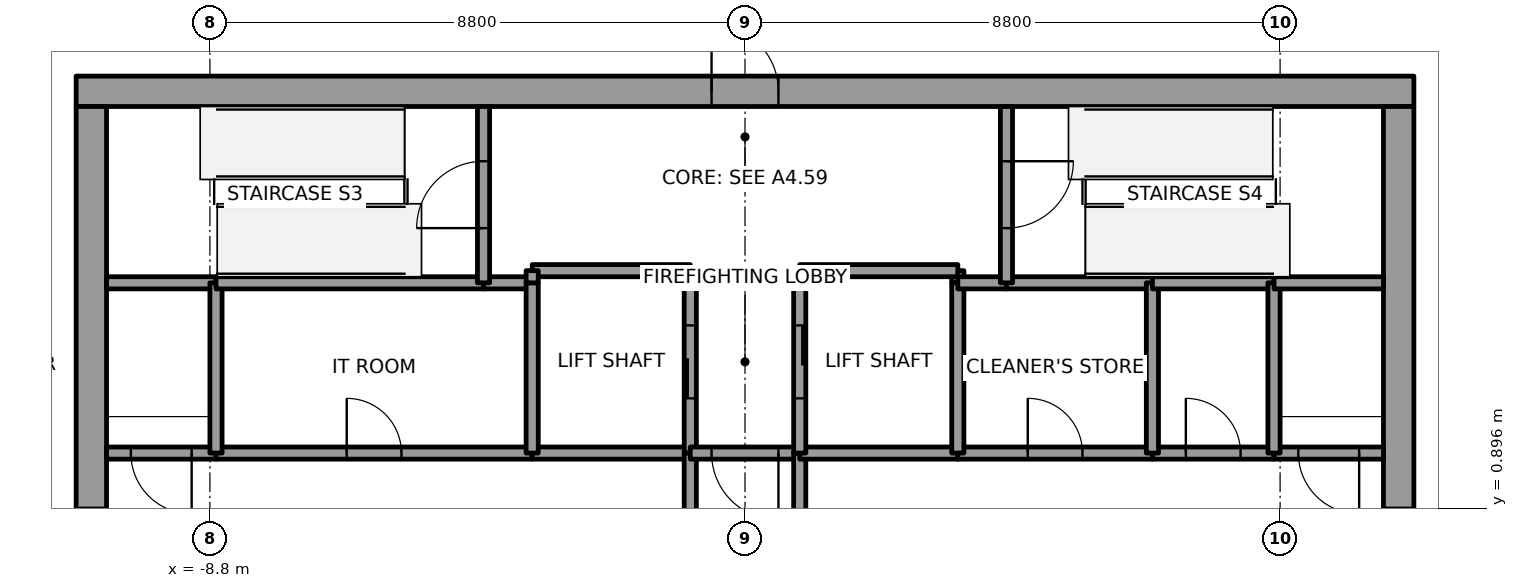
"""IFC4 building model, lengths in metres.
Left out: names, types, materials, properties, quantities, classifications, styles, units other than length and angle.
Written with IfcOpenShell. Run it as: python <this file> out.ifc"""

import sys

from ifc_helpers import new_model, si_unit, direction, frame, frame_2d, origin, place, context, subcontext, project, spatial, rectangle, extrude, element, fill, save


model = new_model("IFC4")
c1 = context("Model", 3, precision=1e-05, world=origin(), true_north=direction((0.0, 1.0)))
c2 = subcontext(c1, "Body", "Model", "MODEL_VIEW")
j1 = project(units=[si_unit("LENGTHUNIT", "METRE"), si_unit("PLANEANGLEUNIT", "RADIAN")], contexts=[c1])
p1 = place(None, origin())
s1 = spatial("IfcSite", under=j1, at=p1, CompositionType="ELEMENT")
p2 = place(p1, origin())
s2 = spatial("IfcBuilding", under=s1, at=p2, CompositionType="ELEMENT")
p3 = place(p2, frame((0.0, 0.0, 255.0)))
s3 = spatial("IfcBuildingStorey", under=s2, at=p3, CompositionType="ELEMENT", Elevation=255.0)
p4 = place(p3, frame((-11.0, 7.75, 0.0), z_axis=(0.0, 0.0, 1.0), x_axis=(1.0, 0.0, 0.0)))
e1 = element("IfcWall", 1, at=p4, inside=s3, PredefinedType="SHEAR", context=c2, shape_type="SweptSolid", body=[
    extrude(rectangle(XDim=22.0, YDim=0.5, at=frame_2d((11.0, 0.0))), origin(), (0.0, 0.0, 1.0), 4.0),
])
p5 = place(p4, frame((10.45, 0.0, 0.0)))
e2 = element("IfcOpeningElement", 2, at=p5, cuts=e1, PredefinedType="OPENING", context=c2, shape_type="SweptSolid", body=[
    extrude(rectangle(XDim=1.1, YDim=2.1, at=frame_2d((0.55, 1.05))), frame((0.0, 0.25, 0.0), z_axis=(0.0, -1.0, 0.0), x_axis=(1.0, 0.0, 0.0)), (0.0, 0.0, 1.0), 0.5),
])
p6 = place(p3, frame((-10.75, -7.5, 0.0), z_axis=(0.0, 0.0, 1.0), x_axis=(0.0, 1.0, 0.0)))
e3 = element("IfcWall", 3, at=p6, inside=s3, PredefinedType="SHEAR", context=c2, shape_type="SweptSolid", body=[
    extrude(rectangle(XDim=15.0, YDim=0.5, at=frame_2d((7.5, 0.0))), origin(), (0.0, 0.0, 1.0), 4.0),
])
p7 = place(p6, frame((6.6, 0.0, 0.0)))
e4 = element("IfcOpeningElement", 4, at=p7, cuts=e3, PredefinedType="OPENING", context=c2, shape_type="SweptSolid", body=[
    extrude(rectangle(XDim=1.8, YDim=2.1, at=frame_2d((0.9, 1.05))), frame((0.0, 0.25, 0.0), z_axis=(0.0, -1.0, 0.0), x_axis=(1.0, 0.0, 0.0)), (0.0, 0.0, 1.0), 0.5),
])
p8 = place(p3, frame((10.75, -7.5, 0.0), z_axis=(0.0, 0.0, 1.0), x_axis=(0.0, 1.0, 0.0)))
e5 = element("IfcWall", 5, at=p8, inside=s3, PredefinedType="SHEAR", context=c2, shape_type="SweptSolid", body=[
    extrude(rectangle(XDim=15.0, YDim=0.5, at=frame_2d((7.5, 0.0))), origin(), (0.0, 0.0, 1.0), 4.0),
])
p9 = place(p8, frame((6.6, 0.0, 0.0)))
e6 = element("IfcOpeningElement", 6, at=p9, cuts=e5, PredefinedType="OPENING", context=c2, shape_type="SweptSolid", body=[
    extrude(rectangle(XDim=1.8, YDim=2.1, at=frame_2d((0.9, 1.05))), frame((0.0, 0.25, 0.0), z_axis=(0.0, -1.0, 0.0), x_axis=(1.0, 0.0, 0.0)), (0.0, 0.0, 1.0), 0.5),
])
p10 = place(p3, frame((-8.7, 1.8, 0.0), z_axis=(0.0, 0.0, 1.0), x_axis=(-1.0, 0.0, 0.0)))
e7 = element("IfcWall", 7, at=p10, inside=s3, PredefinedType="SOLIDWALL", context=c2, shape_type="SweptSolid", body=[
    extrude(rectangle(XDim=1.8, YDim=0.2, at=frame_2d((0.9, 0.0))), origin(), (0.0, 0.0, 1.0), 3.85),
])
p11 = place(p10, frame((0.4, 0.0, 0.0)))
e8 = element("IfcOpeningElement", 8, at=p11, cuts=e7, PredefinedType="OPENING", context=c2, shape_type="SweptSolid", body=[
    extrude(rectangle(XDim=1.0, YDim=2.1, at=frame_2d((0.5, 1.05))), frame((0.0, 0.1, 0.0), z_axis=(0.0, -1.0, 0.0), x_axis=(1.0, 0.0, 0.0)), (0.0, 0.0, 1.0), 0.2),
])
p12 = place(p3, frame((-8.7, 4.6, 0.0), z_axis=(0.0, 0.0, 1.0), x_axis=(-1.0, 0.0, 0.0)))
e9 = element("IfcWall", 9, at=p12, inside=s3, PredefinedType="SOLIDWALL", context=c2, shape_type="SweptSolid", body=[
    extrude(rectangle(XDim=1.8, YDim=0.2, at=frame_2d((0.9, 0.0))), origin(), (0.0, 0.0, 1.0), 3.85),
])
p13 = place(p3, frame((-8.7, 1.8, 0.0), z_axis=(0.0, 0.0, 1.0), x_axis=(1.0, 0.0, 0.0)))
e10 = element("IfcWall", 10, at=p13, inside=s3, PredefinedType="SOLIDWALL", context=c2, shape_type="SweptSolid", body=[
    extrude(rectangle(XDim=5.2, YDim=0.2, at=frame_2d((2.6, 0.0))), origin(), (0.0, 0.0, 1.0), 3.85),
])
p14 = place(p13, frame((2.15, 0.0, 0.0)))
e11 = element("IfcOpeningElement", 11, at=p14, cuts=e10, PredefinedType="OPENING", context=c2, shape_type="SweptSolid", body=[
    extrude(rectangle(XDim=0.9, YDim=2.1, at=frame_2d((0.45, 1.05))), frame((0.0, 0.1, 0.0), z_axis=(0.0, -1.0, 0.0), x_axis=(1.0, 0.0, 0.0)), (0.0, 0.0, 1.0), 0.2),
])
p15 = place(p3, frame((-8.7, 4.6, 0.0), z_axis=(0.0, 0.0, 1.0), x_axis=(0.0, -1.0, 0.0)))
e12 = element("IfcWall", 12, at=p15, inside=s3, PredefinedType="SOLIDWALL", context=c2, shape_type="SweptSolid", body=[
    extrude(rectangle(XDim=2.8, YDim=0.2, at=frame_2d((1.4, 0.0))), origin(), (0.0, 0.0, 1.0), 3.85),
])
p16 = place(p3, frame((-4.3, 4.6, 0.0), z_axis=(0.0, 0.0, 1.0), x_axis=(-1.0, 0.0, 0.0)))
e13 = element("IfcWall", 13, at=p16, inside=s3, PredefinedType="SOLIDWALL", context=c2, shape_type="SweptSolid", body=[
    extrude(rectangle(XDim=4.4, YDim=0.2, at=frame_2d((2.2, 0.0))), origin(), (0.0, 0.0, 1.0), 3.85),
])
p17 = place(p3, frame((-3.5, 4.6, 0.0), z_axis=(0.0, 0.0, 1.0), x_axis=(-1.0, 0.0, 0.0)))
e14 = element("IfcWall", 14, at=p17, inside=s3, PredefinedType="SOLIDWALL", context=c2, shape_type="SweptSolid", body=[
    extrude(rectangle(XDim=0.8, YDim=0.2, at=frame_2d((0.4, 0.0))), origin(), (0.0, 0.0, 1.0), 3.85),
])
p18 = place(p3, frame((-4.3, 4.6, 0.0), z_axis=(0.0, 0.0, 1.0), x_axis=(0.0, 1.0, 0.0)))
e15 = element("IfcWall", 15, at=p18, inside=s3, PredefinedType="SOLIDWALL", context=c2, shape_type="SweptSolid", body=[
    extrude(rectangle(XDim=2.9, YDim=0.2, at=frame_2d((1.45, 0.0))), origin(), (0.0, 0.0, 1.0), 3.85),
])
p19 = place(p18, frame((0.9, 0.0, 0.0)))
e16 = element("IfcOpeningElement", 16, at=p19, cuts=e15, PredefinedType="OPENING", context=c2, shape_type="SweptSolid", body=[
    extrude(rectangle(XDim=1.1, YDim=2.1, at=frame_2d((0.55, 1.05))), frame((0.0, 0.1, 0.0), z_axis=(0.0, -1.0, 0.0), x_axis=(1.0, 0.0, 0.0)), (0.0, 0.0, 1.0), 0.2),
])
p20 = place(p3, frame((-0.9, 1.8, 0.0), z_axis=(0.0, 0.0, 1.0), x_axis=(-1.0, 0.0, 0.0)))
e17 = element("IfcWall", 17, at=p20, inside=s3, PredefinedType="SOLIDWALL", context=c2, shape_type="SweptSolid", body=[
    extrude(rectangle(XDim=2.6, YDim=0.2, at=frame_2d((1.3, 0.0))), origin(), (0.0, 0.0, 1.0), 3.85),
])
p21 = place(p3, frame((-3.5, 1.8, 0.0), z_axis=(0.0, 0.0, 1.0), x_axis=(0.0, 1.0, 0.0)))
e18 = element("IfcWall", 18, at=p21, inside=s3, PredefinedType="SOLIDWALL", context=c2, shape_type="SweptSolid", body=[
    extrude(rectangle(XDim=2.8, YDim=0.2, at=frame_2d((1.4, 0.0))), origin(), (0.0, 0.0, 1.0), 3.85),
])
p22 = place(p3, frame((-0.9, 1.8, 0.0), z_axis=(0.0, 0.0, 1.0), x_axis=(0.0, 1.0, 0.0)))
e19 = element("IfcWall", 19, at=p22, inside=s3, PredefinedType="SOLIDWALL", context=c2, shape_type="SweptSolid", body=[
    extrude(rectangle(XDim=3.0, YDim=0.2, at=frame_2d((1.5, 0.0))), origin(), (0.0, 0.0, 1.0), 3.85),
])
p23 = place(p22, frame((0.9, 0.0, 0.0)))
e20 = element("IfcOpeningElement", 20, at=p23, cuts=e19, PredefinedType="OPENING", context=c2, shape_type="SweptSolid", body=[
    extrude(rectangle(XDim=1.2, YDim=2.1, at=frame_2d((0.6, 1.05))), frame((0.0, 0.1, 0.0), z_axis=(0.0, -1.0, 0.0), x_axis=(1.0, 0.0, 0.0)), (0.0, 0.0, 1.0), 0.2),
])
p24 = place(p3, frame((-0.9, 4.8, 0.0), z_axis=(0.0, 0.0, 1.0), x_axis=(-1.0, 0.0, 0.0)))
e21 = element("IfcWall", 21, at=p24, inside=s3, PredefinedType="SOLIDWALL", context=c2, shape_type="SweptSolid", body=[
    extrude(rectangle(XDim=2.6, YDim=0.2, at=frame_2d((1.3, 0.0))), origin(), (0.0, 0.0, 1.0), 3.85),
])
p25 = place(p3, frame((-3.5, 4.8, 0.0), z_axis=(0.0, 0.0, 1.0), x_axis=(0.0, -1.0, 0.0)))
e22 = element("IfcWall", 22, at=p25, inside=s3, PredefinedType="SOLIDWALL", context=c2, shape_type="SweptSolid", body=[
    extrude(rectangle(XDim=0.2, YDim=0.2, at=frame_2d((0.1, 0.0))), origin(), (0.0, 0.0, 1.0), 3.85),
])
p26 = place(p3, frame((-0.9, 1.8, 0.0), z_axis=(0.0, 0.0, 1.0), x_axis=(0.0, -1.0, 0.0)))
e23 = element("IfcWall", 23, at=p26, inside=s3, PredefinedType="SOLIDWALL", context=c2, shape_type="SweptSolid", body=[
    extrude(rectangle(XDim=3.6, YDim=0.2, at=frame_2d((1.8, 0.0))), origin(), (0.0, 0.0, 1.0), 3.85),
])
p27 = place(p26, frame((1.05, 0.0, 0.0)))
e24 = element("IfcOpeningElement", 24, at=p27, cuts=e23, PredefinedType="OPENING", context=c2, shape_type="SweptSolid", body=[
    extrude(rectangle(XDim=1.5, YDim=2.1, at=frame_2d((0.75, 1.05))), frame((0.0, 0.1, 0.0), z_axis=(0.0, -1.0, 0.0), x_axis=(1.0, 0.0, 0.0)), (0.0, 0.0, 1.0), 0.2),
])
p28 = place(p3, frame((0.9, 1.8, 0.0), z_axis=(0.0, 0.0, 1.0), x_axis=(-1.0, 0.0, 0.0)))
e25 = element("IfcWall", 25, at=p28, inside=s3, PredefinedType="SOLIDWALL", context=c2, shape_type="SweptSolid", body=[
    extrude(rectangle(XDim=1.8, YDim=0.2, at=frame_2d((0.9, 0.0))), origin(), (0.0, 0.0, 1.0), 3.85),
])
p29 = place(p28, frame((0.35, 0.0, 0.0)))
e26 = element("IfcOpeningElement", 26, at=p29, cuts=e25, PredefinedType="OPENING", context=c2, shape_type="SweptSolid", body=[
    extrude(rectangle(XDim=1.1, YDim=2.1, at=frame_2d((0.55, 1.05))), frame((0.0, 0.1, 0.0), z_axis=(0.0, -1.0, 0.0), x_axis=(1.0, 0.0, 0.0)), (0.0, 0.0, 1.0), 0.2),
])
p30 = place(p3, frame((0.9, -1.8, 0.0), z_axis=(0.0, 0.0, 1.0), x_axis=(0.0, 1.0, 0.0)))
e27 = element("IfcWall", 27, at=p30, inside=s3, PredefinedType="SOLIDWALL", context=c2, shape_type="SweptSolid", body=[
    extrude(rectangle(XDim=3.6, YDim=0.2, at=frame_2d((1.8, 0.0))), origin(), (0.0, 0.0, 1.0), 3.85),
])
p31 = place(p30, frame((1.05, 0.0, 0.0)))
e28 = element("IfcOpeningElement", 28, at=p31, cuts=e27, PredefinedType="OPENING", context=c2, shape_type="SweptSolid", body=[
    extrude(rectangle(XDim=1.5, YDim=2.1, at=frame_2d((0.75, 1.05))), frame((0.0, 0.1, 0.0), z_axis=(0.0, -1.0, 0.0), x_axis=(1.0, 0.0, 0.0)), (0.0, 0.0, 1.0), 0.2),
])
p32 = place(p3, frame((3.5, 1.8, 0.0), z_axis=(0.0, 0.0, 1.0), x_axis=(-1.0, 0.0, 0.0)))
e29 = element("IfcWall", 29, at=p32, inside=s3, PredefinedType="SOLIDWALL", context=c2, shape_type="SweptSolid", body=[
    extrude(rectangle(XDim=2.6, YDim=0.2, at=frame_2d((1.3, 0.0))), origin(), (0.0, 0.0, 1.0), 3.85),
])
p33 = place(p3, frame((3.5, 4.6, 0.0), z_axis=(0.0, 0.0, 1.0), x_axis=(0.0, 1.0, 0.0)))
e30 = element("IfcWall", 30, at=p33, inside=s3, PredefinedType="SOLIDWALL", context=c2, shape_type="SweptSolid", body=[
    extrude(rectangle(XDim=0.2, YDim=0.2, at=frame_2d((0.1, 0.0))), origin(), (0.0, 0.0, 1.0), 3.85),
])
p34 = place(p3, frame((3.5, 4.8, 0.0), z_axis=(0.0, 0.0, 1.0), x_axis=(-1.0, 0.0, 0.0)))
e31 = element("IfcWall", 31, at=p34, inside=s3, PredefinedType="SOLIDWALL", context=c2, shape_type="SweptSolid", body=[
    extrude(rectangle(XDim=2.6, YDim=0.2, at=frame_2d((1.3, 0.0))), origin(), (0.0, 0.0, 1.0), 3.85),
])
p35 = place(p3, frame((0.9, 4.8, 0.0), z_axis=(0.0, 0.0, 1.0), x_axis=(0.0, -1.0, 0.0)))
e32 = element("IfcWall", 32, at=p35, inside=s3, PredefinedType="SOLIDWALL", context=c2, shape_type="SweptSolid", body=[
    extrude(rectangle(XDim=3.0, YDim=0.2, at=frame_2d((1.5, 0.0))), origin(), (0.0, 0.0, 1.0), 3.85),
])
p36 = place(p35, frame((0.9, 0.0, 0.0)))
e33 = element("IfcOpeningElement", 33, at=p36, cuts=e32, PredefinedType="OPENING", context=c2, shape_type="SweptSolid", body=[
    extrude(rectangle(XDim=1.2, YDim=2.1, at=frame_2d((0.6, 1.05))), frame((0.0, 0.1, 0.0), z_axis=(0.0, -1.0, 0.0), x_axis=(1.0, 0.0, 0.0)), (0.0, 0.0, 1.0), 0.2),
])
p37 = place(p3, frame((3.5, 1.8, 0.0), z_axis=(0.0, 0.0, 1.0), x_axis=(1.0, 0.0, 0.0)))
e34 = element("IfcWall", 34, at=p37, inside=s3, PredefinedType="SOLIDWALL", context=c2, shape_type="SweptSolid", body=[
    extrude(rectangle(XDim=3.2, YDim=0.2, at=frame_2d((1.6, 0.0))), origin(), (0.0, 0.0, 1.0), 3.85),
])
p38 = place(p37, frame((1.15, 0.0, 0.0)))
e35 = element("IfcOpeningElement", 35, at=p38, cuts=e34, PredefinedType="OPENING", context=c2, shape_type="SweptSolid", body=[
    extrude(rectangle(XDim=0.9, YDim=2.1, at=frame_2d((0.45, 1.05))), frame((0.0, 0.1, 0.0), z_axis=(0.0, -1.0, 0.0), x_axis=(1.0, 0.0, 0.0)), (0.0, 0.0, 1.0), 0.2),
])
p39 = place(p3, frame((3.5, 4.6, 0.0), z_axis=(0.0, 0.0, 1.0), x_axis=(0.0, -1.0, 0.0)))
e36 = element("IfcWall", 36, at=p39, inside=s3, PredefinedType="SOLIDWALL", context=c2, shape_type="SweptSolid", body=[
    extrude(rectangle(XDim=2.8, YDim=0.2, at=frame_2d((1.4, 0.0))), origin(), (0.0, 0.0, 1.0), 3.85),
])
p40 = place(p3, frame((4.3, 4.6, 0.0), z_axis=(0.0, 0.0, 1.0), x_axis=(-1.0, 0.0, 0.0)))
e37 = element("IfcWall", 37, at=p40, inside=s3, PredefinedType="SOLIDWALL", context=c2, shape_type="SweptSolid", body=[
    extrude(rectangle(XDim=0.8, YDim=0.2, at=frame_2d((0.4, 0.0))), origin(), (0.0, 0.0, 1.0), 3.85),
])
p41 = place(p3, frame((6.7, 4.6, 0.0), z_axis=(0.0, 0.0, 1.0), x_axis=(-1.0, 0.0, 0.0)))
e38 = element("IfcWall", 38, at=p41, inside=s3, PredefinedType="SOLIDWALL", context=c2, shape_type="SweptSolid", body=[
    extrude(rectangle(XDim=2.4, YDim=0.2, at=frame_2d((1.2, 0.0))), origin(), (0.0, 0.0, 1.0), 3.85),
])
p42 = place(p3, frame((4.3, 7.5, 0.0), z_axis=(0.0, 0.0, 1.0), x_axis=(0.0, -1.0, 0.0)))
e39 = element("IfcWall", 39, at=p42, inside=s3, PredefinedType="SOLIDWALL", context=c2, shape_type="SweptSolid", body=[
    extrude(rectangle(XDim=2.9, YDim=0.2, at=frame_2d((1.45, 0.0))), origin(), (0.0, 0.0, 1.0), 3.85),
])
p43 = place(p42, frame((0.9, 0.0, 0.0)))
e40 = element("IfcOpeningElement", 40, at=p43, cuts=e39, PredefinedType="OPENING", context=c2, shape_type="SweptSolid", body=[
    extrude(rectangle(XDim=1.1, YDim=2.1, at=frame_2d((0.55, 1.05))), frame((0.0, 0.1, 0.0), z_axis=(0.0, -1.0, 0.0), x_axis=(1.0, 0.0, 0.0)), (0.0, 0.0, 1.0), 0.2),
])
p44 = place(p3, frame((6.7, 1.8, 0.0), z_axis=(0.0, 0.0, 1.0), x_axis=(1.0, 0.0, 0.0)))
e41 = element("IfcWall", 41, at=p44, inside=s3, PredefinedType="SOLIDWALL", context=c2, shape_type="SweptSolid", body=[
    extrude(rectangle(XDim=2.0, YDim=0.2, at=frame_2d((1.0, 0.0))), origin(), (0.0, 0.0, 1.0), 3.85),
])
p45 = place(p44, frame((0.55, 0.0, 0.0)))
e42 = element("IfcOpeningElement", 42, at=p45, cuts=e41, PredefinedType="OPENING", context=c2, shape_type="SweptSolid", body=[
    extrude(rectangle(XDim=0.9, YDim=2.1, at=frame_2d((0.45, 1.05))), frame((0.0, 0.1, 0.0), z_axis=(0.0, -1.0, 0.0), x_axis=(1.0, 0.0, 0.0)), (0.0, 0.0, 1.0), 0.2),
])
p46 = place(p3, frame((6.7, 1.8, 0.0), z_axis=(0.0, 0.0, 1.0), x_axis=(0.0, 1.0, 0.0)))
e43 = element("IfcWall", 43, at=p46, inside=s3, PredefinedType="SOLIDWALL", context=c2, shape_type="SweptSolid", body=[
    extrude(rectangle(XDim=2.8, YDim=0.2, at=frame_2d((1.4, 0.0))), origin(), (0.0, 0.0, 1.0), 3.85),
])
p47 = place(p3, frame((8.7, 4.6, 0.0), z_axis=(0.0, 0.0, 1.0), x_axis=(-1.0, 0.0, 0.0)))
e44 = element("IfcWall", 44, at=p47, inside=s3, PredefinedType="SOLIDWALL", context=c2, shape_type="SweptSolid", body=[
    extrude(rectangle(XDim=2.0, YDim=0.2, at=frame_2d((1.0, 0.0))), origin(), (0.0, 0.0, 1.0), 3.85),
])
p48 = place(p3, frame((10.5, 1.8, 0.0), z_axis=(0.0, 0.0, 1.0), x_axis=(-1.0, 0.0, 0.0)))
e45 = element("IfcWall", 45, at=p48, inside=s3, PredefinedType="SOLIDWALL", context=c2, shape_type="SweptSolid", body=[
    extrude(rectangle(XDim=1.8, YDim=0.2, at=frame_2d((0.9, 0.0))), origin(), (0.0, 0.0, 1.0), 3.85),
])
p49 = place(p48, frame((0.4, 0.0, 0.0)))
e46 = element("IfcOpeningElement", 46, at=p49, cuts=e45, PredefinedType="OPENING", context=c2, shape_type="SweptSolid", body=[
    extrude(rectangle(XDim=1.0, YDim=2.1, at=frame_2d((0.5, 1.05))), frame((0.0, 0.1, 0.0), z_axis=(0.0, -1.0, 0.0), x_axis=(1.0, 0.0, 0.0)), (0.0, 0.0, 1.0), 0.2),
])
p50 = place(p3, frame((8.7, 1.8, 0.0), z_axis=(0.0, 0.0, 1.0), x_axis=(0.0, 1.0, 0.0)))
e47 = element("IfcWall", 47, at=p50, inside=s3, PredefinedType="SOLIDWALL", context=c2, shape_type="SweptSolid", body=[
    extrude(rectangle(XDim=2.8, YDim=0.2, at=frame_2d((1.4, 0.0))), origin(), (0.0, 0.0, 1.0), 3.85),
])
p51 = place(p3, frame((10.5, 4.6, 0.0), z_axis=(0.0, 0.0, 1.0), x_axis=(-1.0, 0.0, 0.0)))
e48 = element("IfcWall", 48, at=p51, inside=s3, PredefinedType="SOLIDWALL", context=c2, shape_type="SweptSolid", body=[
    extrude(rectangle(XDim=1.8, YDim=0.2, at=frame_2d((0.9, 0.0))), origin(), (0.0, 0.0, 1.0), 3.85),
])
p52 = place(p23, origin())
e49 = element("IfcDoor", 49, at=p52, inside=s3, OperationType="SLIDING_TO_LEFT", PredefinedType="DOOR", context=c2, shape_type="SweptSolid", body=[
    extrude(rectangle(XDim=1.2, YDim=2.1, at=frame_2d((0.6, 1.05))), frame((0.0, 0.025, 0.0), z_axis=(0.0, -1.0, 0.0), x_axis=(1.0, 0.0, 0.0)), (0.0, 0.0, 1.0), 0.05),
])
fill(e20, e49)
p53 = place(p36, origin())
e50 = element("IfcDoor", 50, at=p53, inside=s3, OperationType="SLIDING_TO_LEFT", PredefinedType="DOOR", context=c2, shape_type="SweptSolid", body=[
    extrude(rectangle(XDim=1.2, YDim=2.1, at=frame_2d((0.6, 1.05))), frame((0.0, 0.025, 0.0), z_axis=(0.0, -1.0, 0.0), x_axis=(1.0, 0.0, 0.0)), (0.0, 0.0, 1.0), 0.05),
])
fill(e33, e50)
p54 = place(p29, origin())
e51 = element("IfcDoor", 51, at=p54, inside=s3, OperationType="SINGLE_SWING_LEFT", PredefinedType="DOOR", context=c2, shape_type="SweptSolid", body=[
    extrude(rectangle(XDim=1.1, YDim=2.1, at=frame_2d((0.55, 1.05))), frame((0.0, 0.025, 0.0), z_axis=(0.0, -1.0, 0.0), x_axis=(1.0, 0.0, 0.0)), (0.0, 0.0, 1.0), 0.05),
])
fill(e26, e51)
p55 = place(p11, origin())
e52 = element("IfcDoor", 52, at=p55, inside=s3, OperationType="SINGLE_SWING_RIGHT", PredefinedType="DOOR", context=c2, shape_type="SweptSolid", body=[
    extrude(rectangle(XDim=1.0, YDim=2.1, at=frame_2d((0.5, 1.05))), frame((0.0, 0.025, 0.0), z_axis=(0.0, -1.0, 0.0), x_axis=(1.0, 0.0, 0.0)), (0.0, 0.0, 1.0), 0.05),
])
fill(e8, e52)
p56 = place(p49, origin())
e53 = element("IfcDoor", 53, at=p56, inside=s3, OperationType="SINGLE_SWING_LEFT", PredefinedType="DOOR", context=c2, shape_type="SweptSolid", body=[
    extrude(rectangle(XDim=1.0, YDim=2.1, at=frame_2d((0.5, 1.05))), frame((0.0, 0.025, 0.0), z_axis=(0.0, -1.0, 0.0), x_axis=(1.0, 0.0, 0.0)), (0.0, 0.0, 1.0), 0.05),
])
fill(e46, e53)
p57 = place(p19, origin())
e54 = element("IfcDoor", 54, at=p57, inside=s3, OperationType="SINGLE_SWING_RIGHT", PredefinedType="DOOR", context=c2, shape_type="SweptSolid", body=[
    extrude(rectangle(XDim=1.1, YDim=2.1, at=frame_2d((0.55, 1.05))), frame((0.0, 0.025, 0.0), z_axis=(0.0, -1.0, 0.0), x_axis=(1.0, 0.0, 0.0)), (0.0, 0.0, 1.0), 0.05),
])
fill(e16, e54)
p58 = place(p43, origin())
e55 = element("IfcDoor", 55, at=p58, inside=s3, OperationType="SINGLE_SWING_LEFT", PredefinedType="DOOR", context=c2, shape_type="SweptSolid", body=[
    extrude(rectangle(XDim=1.1, YDim=2.1, at=frame_2d((0.55, 1.05))), frame((0.0, 0.025, 0.0), z_axis=(0.0, -1.0, 0.0), x_axis=(1.0, 0.0, 0.0)), (0.0, 0.0, 1.0), 0.05),
])
fill(e40, e55)
p59 = place(p38, origin())
e56 = element("IfcDoor", 56, at=p59, inside=s3, OperationType="SINGLE_SWING_RIGHT", PredefinedType="DOOR", context=c2, shape_type="SweptSolid", body=[
    extrude(rectangle(XDim=0.9, YDim=2.1, at=frame_2d((0.45, 1.05))), frame((0.0, 0.025, 0.0), z_axis=(0.0, -1.0, 0.0), x_axis=(1.0, 0.0, 0.0)), (0.0, 0.0, 1.0), 0.05),
])
fill(e35, e56)
p60 = place(p45, origin())
e57 = element("IfcDoor", 57, at=p60, inside=s3, OperationType="SINGLE_SWING_RIGHT", PredefinedType="DOOR", context=c2, shape_type="SweptSolid", body=[
    extrude(rectangle(XDim=0.9, YDim=2.1, at=frame_2d((0.45, 1.05))), frame((0.0, 0.025, 0.0), z_axis=(0.0, -1.0, 0.0), x_axis=(1.0, 0.0, 0.0)), (0.0, 0.0, 1.0), 0.05),
])
fill(e42, e57)
p61 = place(p14, origin())
e58 = element("IfcDoor", 58, at=p61, inside=s3, OperationType="SINGLE_SWING_LEFT", PredefinedType="DOOR", context=c2, shape_type="SweptSolid", body=[
    extrude(rectangle(XDim=0.9, YDim=2.1, at=frame_2d((0.45, 1.05))), frame((0.0, 0.025, 0.0), z_axis=(0.0, -1.0, 0.0), x_axis=(1.0, 0.0, 0.0)), (0.0, 0.0, 1.0), 0.05),
])
fill(e11, e58)
p62 = place(p7, origin())
e59 = element("IfcDoor", 59, at=p62, inside=s3, OperationType="DOUBLE_DOOR_SINGLE_SWING", PredefinedType="DOOR", context=c2, shape_type="SweptSolid", body=[
    extrude(rectangle(XDim=1.8, YDim=2.1, at=frame_2d((0.9, 1.05))), frame((0.0, 0.025, 0.0), z_axis=(0.0, -1.0, 0.0), x_axis=(1.0, 0.0, 0.0)), (0.0, 0.0, 1.0), 0.05),
])
fill(e4, e59)
p63 = place(p9, origin())
e60 = element("IfcDoor", 60, at=p63, inside=s3, OperationType="DOUBLE_DOOR_SINGLE_SWING", PredefinedType="DOOR", context=c2, shape_type="SweptSolid", body=[
    extrude(rectangle(XDim=1.8, YDim=2.1, at=frame_2d((0.9, 1.05))), frame((0.0, 0.025, 0.0), z_axis=(0.0, -1.0, 0.0), x_axis=(1.0, 0.0, 0.0)), (0.0, 0.0, 1.0), 0.05),
])
fill(e6, e60)
p64 = place(p5, origin())
e61 = element("IfcDoor", 61, at=p64, inside=s3, OperationType="SINGLE_SWING_LEFT", PredefinedType="DOOR", context=c2, shape_type="SweptSolid", body=[
    extrude(rectangle(XDim=1.1, YDim=2.1, at=frame_2d((0.55, 1.05))), frame((0.0, 0.025, 0.0), z_axis=(0.0, -1.0, 0.0), x_axis=(1.0, 0.0, 0.0)), (0.0, 0.0, 1.0), 0.05),
])
fill(e2, e61)
save(model, sys.argv[1])
